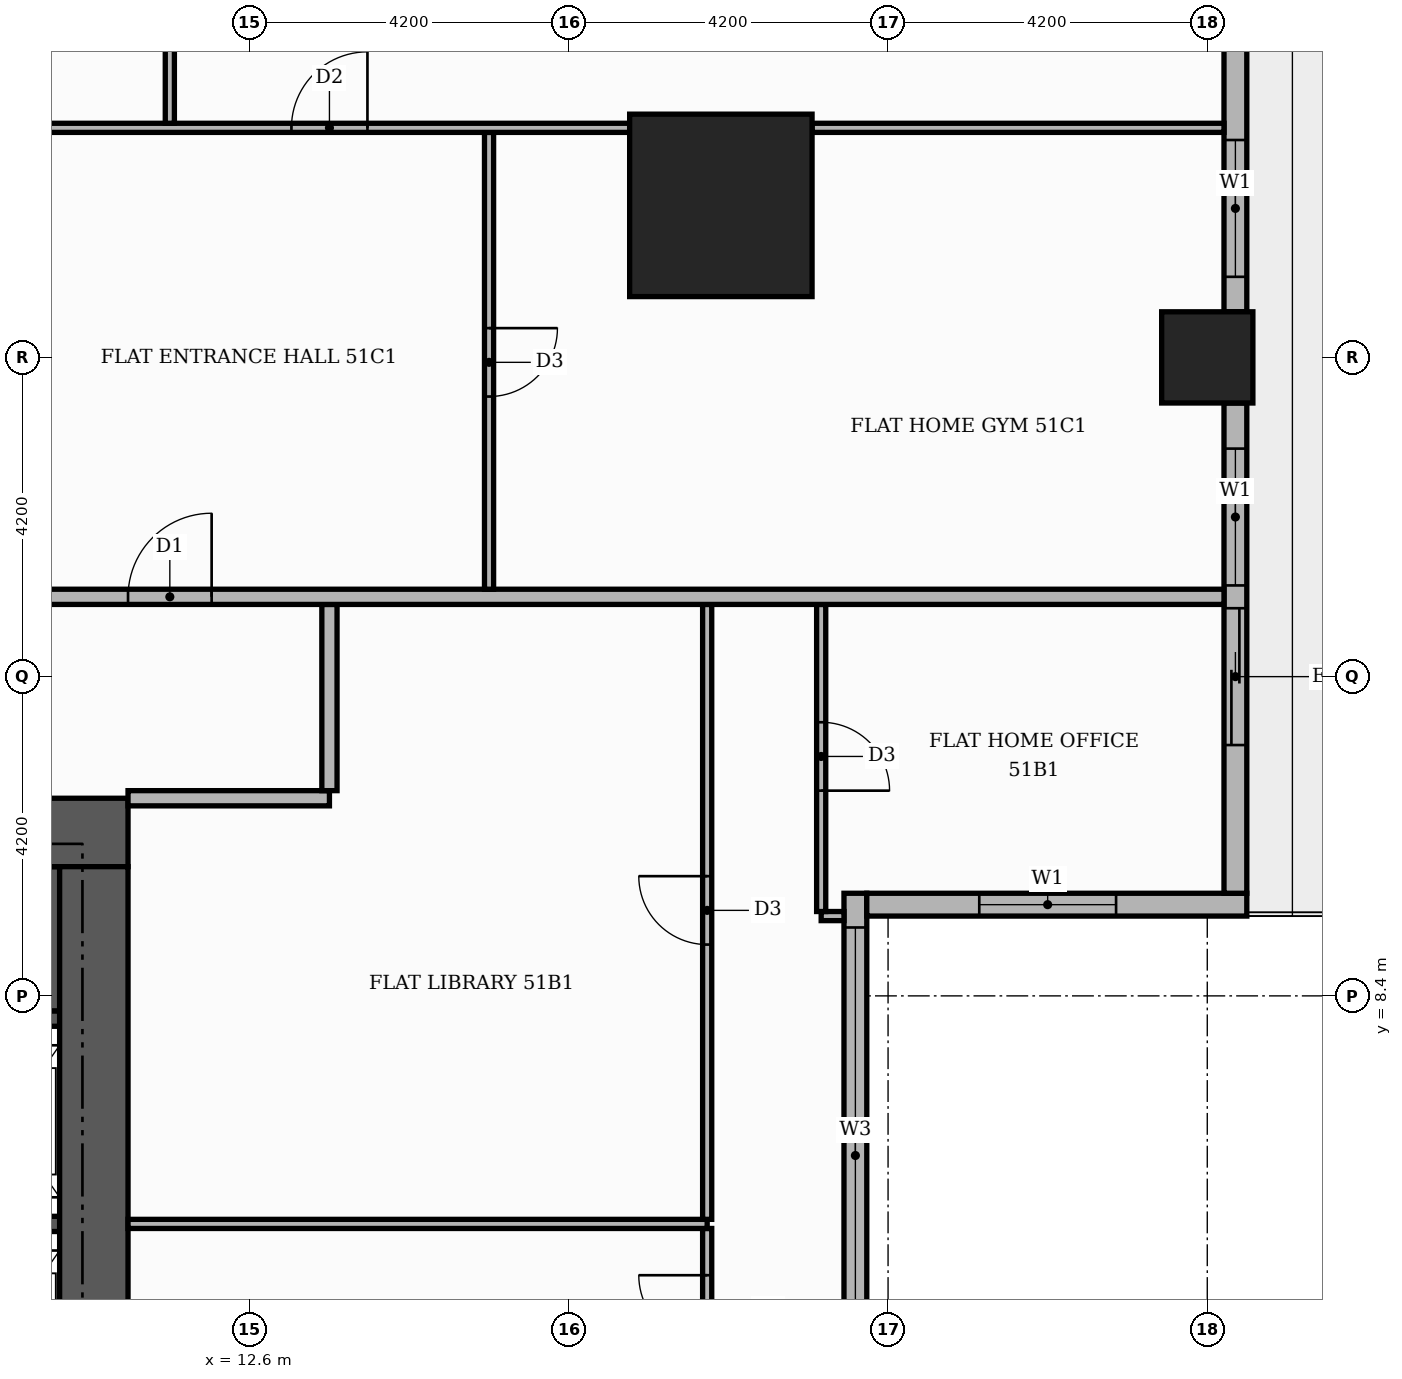
"""IFC4 building model, lengths in metres.
Left out: names, types, materials, properties, quantities, classifications, styles, units other than length and angle.
Written with IfcOpenShell. Run it as: python <this file> out.ifc"""

import sys

from ifc_helpers import new_model, si_unit, direction, frame, frame_2d, origin, origin_2d, place, context, subcontext, project, spatial, rectangle, extrude, element, fill, save


model = new_model("IFC4")
c1 = context("Model", 3, precision=1e-05, world=origin(), true_north=direction((0.0, 1.0)))
c2 = subcontext(c1, "Body", "Model", "MODEL_VIEW")
j1 = project(units=[si_unit("LENGTHUNIT", "METRE"), si_unit("PLANEANGLEUNIT", "RADIAN")], contexts=[c1])
p1 = place(None, origin())
s1 = spatial("IfcSite", under=j1, at=p1, CompositionType="ELEMENT")
p2 = place(p1, origin())
s2 = spatial("IfcBuilding", under=s1, at=p2, CompositionType="ELEMENT")
p3 = place(p2, frame((0.0, 0.0, 215.7)))
s3 = spatial("IfcBuildingStorey", under=s2, at=p3, CompositionType="ELEMENT", Elevation=215.7)
p4 = place(p3, frame((5.5, 9.15, 0.0), z_axis=(0.0, 0.0, 1.0), x_axis=(1.0, 0.0, 0.0)))
e1 = element("IfcWall", 1, at=p4, inside=s3, PredefinedType="SHEAR", context=c2, shape_type="SweptSolid", body=[
    extrude(rectangle(XDim=4.6, YDim=1.9, at=frame_2d((2.3, 0.0))), origin(), (0.0, 0.0, 1.0), 3.48),
])
for number, where, z_axis, x_axis in (
    (2, (8.1, 5.4, 0.0), (0.0, 0.0, 1.0), (1.0, 0.0, 0.0)),
    (3, (8.1, 8.1, 0.0), (0.0, 0.0, 1.0), (1.0, 0.0, 0.0)),
):
    element("IfcWall", number, at=place(p3, frame(where, z_axis=z_axis, x_axis=x_axis)), inside=s3, PredefinedType="SHEAR", context=c2, shape_type="SweptSolid", body=[
        extrude(rectangle(XDim=2.0, YDim=0.2, at=frame_2d((1.0, 0.0))), origin(), (0.0, 0.0, 1.0), 3.48),
    ])
p5 = place(p3, frame((-11.0, 10.55, 0.0), z_axis=(0.0, 0.0, 1.0), x_axis=(1.0, 0.0, 0.0)))
e4 = element("IfcWall", 4, at=p5, inside=s3, PredefinedType="SHEAR", context=c2, shape_type="SweptSolid", body=[
    extrude(rectangle(XDim=22.0, YDim=0.9, at=frame_2d((11.0, 0.0))), origin(), (0.0, 0.0, 1.0), 3.48),
])
p6 = place(p5, frame((13.3, 0.0, 0.0)))
e5 = element("IfcOpeningElement", 5, at=p6, cuts=e4, PredefinedType="OPENING", context=c2, shape_type="SweptSolid", body=[
    extrude(rectangle(XDim=1.8, YDim=2.2, at=frame_2d((0.9, 1.1))), frame((0.0, 0.46, 0.0), z_axis=(0.0, -1.0, 0.0), x_axis=(1.0, 0.0, 0.0)), (0.0, 0.0, 1.0), 0.92),
])
p7 = place(p3, frame((10.55, -10.1, 0.0), z_axis=(0.0, 0.0, 1.0), x_axis=(0.0, 1.0, 0.0)))
e6 = element("IfcWall", 6, at=p7, inside=s3, PredefinedType="SHEAR", context=c2, shape_type="SweptSolid", body=[
    extrude(rectangle(XDim=20.2, YDim=0.9, at=frame_2d((10.1, 0.0))), origin(), (0.0, 0.0, 1.0), 3.48),
])
p8 = place(p3, frame((18.8, 18.8, 0.0), z_axis=(0.0, 0.0, 1.0), x_axis=(1.0, 0.0, 0.0)))
e7 = element("IfcColumn", 7, at=p8, inside=s3, PredefinedType="COLUMN", context=c2, shape_type="SweptSolid", body=[
    extrude(rectangle(XDim=2.4, YDim=2.4, at=origin_2d()), origin(), (0.0, 0.0, 1.0), 3.9),
])
p9 = place(p3, frame((25.2, 16.8, 0.0), z_axis=(0.0, 0.0, 1.0), x_axis=(1.0, 0.0, 0.0)))
e8 = element("IfcColumn", 8, at=p9, inside=s3, PredefinedType="COLUMN", context=c2, shape_type="SweptSolid", body=[
    extrude(rectangle(XDim=1.2, YDim=1.2, at=origin_2d()), origin(), (0.0, 0.0, 1.0), 3.9),
])
p10 = place(p3, frame((20.57, -9.45, 0.0), z_axis=(0.0, 0.0, 1.0), x_axis=(0.0, 1.0, 0.0)))
e9 = element("IfcWall", 9, at=p10, inside=s3, PredefinedType="STANDARD", context=c2, shape_type="SweptSolid", body=[
    extrude(rectangle(XDim=19.2, YDim=0.3, at=frame_2d((9.6, 0.0))), origin(), (0.0, 0.0, 1.0), 3.48),
])
p11 = place(p10, frame((0.15, 0.0, 0.9)))
e10 = element("IfcOpeningElement", 10, at=p11, cuts=e9, PredefinedType="OPENING", context=c2, shape_type="SweptSolid", body=[
    extrude(rectangle(XDim=6.0, YDim=2.1, at=frame_2d((3.0, 1.05))), frame((0.0, 0.16, 0.0), z_axis=(0.0, -1.0, 0.0), x_axis=(1.0, 0.0, 0.0)), (0.0, 0.0, 1.0), 0.32),
])
p12 = place(p10, frame((6.45, 0.0, 0.9)))
e11 = element("IfcOpeningElement", 11, at=p12, cuts=e9, PredefinedType="OPENING", context=c2, shape_type="SweptSolid", body=[
    extrude(rectangle(XDim=6.0, YDim=2.1, at=frame_2d((3.0, 1.05))), frame((0.0, 0.16, 0.0), z_axis=(0.0, -1.0, 0.0), x_axis=(1.0, 0.0, 0.0)), (0.0, 0.0, 1.0), 0.32),
])
p13 = place(p10, frame((12.75, 0.0, 0.9)))
e12 = element("IfcOpeningElement", 12, at=p13, cuts=e9, PredefinedType="OPENING", context=c2, shape_type="SweptSolid", body=[
    extrude(rectangle(XDim=6.0, YDim=2.1, at=frame_2d((3.0, 1.05))), frame((0.0, 0.16, 0.0), z_axis=(0.0, -1.0, 0.0), x_axis=(1.0, 0.0, 0.0)), (0.0, 0.0, 1.0), 0.32),
])
p14 = place(p3, frame((20.72, 9.6, 0.0), z_axis=(0.0, 0.0, 1.0), x_axis=(1.0, 0.0, 0.0)))
e13 = element("IfcWall", 13, at=p14, inside=s3, PredefinedType="STANDARD", context=c2, shape_type="SweptSolid", body=[
    extrude(rectangle(XDim=5.0, YDim=0.3, at=frame_2d((2.5, 0.0))), origin(), (0.0, 0.0, 1.0), 3.48),
])
p15 = place(p14, frame((1.48, 0.0, 0.9)))
e14 = element("IfcOpeningElement", 14, at=p15, cuts=e13, PredefinedType="OPENING", context=c2, shape_type="SweptSolid", body=[
    extrude(rectangle(XDim=1.8, YDim=2.1, at=frame_2d((0.9, 1.05))), frame((0.0, 0.16, 0.0), z_axis=(0.0, -1.0, 0.0), x_axis=(1.0, 0.0, 0.0)), (0.0, 0.0, 1.0), 0.32),
])
p16 = place(p3, frame((25.57, 9.75, 0.0), z_axis=(0.0, 0.0, 1.0), x_axis=(0.0, 1.0, 0.0)))
e15 = element("IfcWall", 15, at=p16, inside=s3, PredefinedType="STANDARD", context=c2, shape_type="SweptSolid", body=[
    extrude(rectangle(XDim=6.45, YDim=0.3, at=frame_2d((3.225, 0.0))), origin(), (0.0, 0.0, 1.0), 3.48),
])
p17 = place(p16, frame((1.95, 0.0, 0.0)))
e16 = element("IfcOpeningElement", 16, at=p17, cuts=e15, PredefinedType="OPENING", context=c2, shape_type="SweptSolid", body=[
    extrude(rectangle(XDim=1.8, YDim=2.4, at=frame_2d((0.9, 1.2))), frame((0.0, 0.16, 0.0), z_axis=(0.0, -1.0, 0.0), x_axis=(1.0, 0.0, 0.0)), (0.0, 0.0, 1.0), 0.32),
])
p18 = place(p16, frame((4.05, 0.0, 0.9)))
e17 = element("IfcOpeningElement", 17, at=p18, cuts=e15, PredefinedType="OPENING", context=c2, shape_type="SweptSolid", body=[
    extrude(rectangle(XDim=1.8, YDim=2.1, at=frame_2d((0.9, 1.05))), frame((0.0, 0.16, 0.0), z_axis=(0.0, -1.0, 0.0), x_axis=(1.0, 0.0, 0.0)), (0.0, 0.0, 1.0), 0.32),
])
p19 = place(p3, frame((25.57, 17.4, 0.0), z_axis=(0.0, 0.0, 1.0), x_axis=(0.0, 1.0, 0.0)))
e18 = element("IfcWall", 18, at=p19, inside=s3, PredefinedType="STANDARD", context=c2, shape_type="SweptSolid", body=[
    extrude(rectangle(XDim=3.82, YDim=0.3, at=frame_2d((1.91, 0.0))), origin(), (0.0, 0.0, 1.0), 3.48),
])
p20 = place(p19, frame((0.46, 0.0, 0.9)))
e19 = element("IfcOpeningElement", 19, at=p20, cuts=e18, PredefinedType="OPENING", context=c2, shape_type="SweptSolid", body=[
    extrude(rectangle(XDim=1.8, YDim=2.1, at=frame_2d((0.9, 1.05))), frame((0.0, 0.16, 0.0), z_axis=(0.0, -1.0, 0.0), x_axis=(1.0, 0.0, 0.0)), (0.0, 0.0, 1.0), 0.32),
])
p21 = place(p3, frame((18.62, 3.21, 0.0), z_axis=(0.0, 0.0, 1.0), x_axis=(0.0, 1.0, 0.0)))
e20 = element("IfcWall", 20, at=p21, inside=s3, PredefinedType="PARTITIONING", context=c2, shape_type="SweptSolid", body=[
    extrude(rectangle(XDim=2.13, YDim=0.12, at=frame_2d((1.065, 0.0))), origin(), (0.0, 0.0, 1.0), 3.48),
])
p22 = place(p21, frame((0.615, 0.0, 0.0)))
e21 = element("IfcOpeningElement", 21, at=p22, cuts=e20, PredefinedType="OPENING", context=c2, shape_type="SweptSolid", body=[
    extrude(rectangle(XDim=0.9, YDim=2.1, at=frame_2d((0.45, 1.05))), frame((0.0, 0.07, 0.0), z_axis=(0.0, -1.0, 0.0), x_axis=(1.0, 0.0, 0.0)), (0.0, 0.0, 1.0), 0.14),
])
p23 = place(p3, frame((11.0, 5.4, 0.0), z_axis=(0.0, 0.0, 1.0), x_axis=(1.0, 0.0, 0.0)))
e22 = element("IfcWall", 22, at=p23, inside=s3, PredefinedType="PARTITIONING", context=c2, shape_type="SweptSolid", body=[
    extrude(rectangle(XDim=7.62, YDim=0.12, at=frame_2d((3.81, 0.0))), origin(), (0.0, 0.0, 1.0), 3.48),
])
p24 = place(p3, frame((18.62, 5.46, 0.0), z_axis=(0.0, 0.0, 1.0), x_axis=(0.0, 1.0, 0.0)))
e23 = element("IfcWall", 23, at=p24, inside=s3, PredefinedType="PARTITIONING", context=c2, shape_type="SweptSolid", body=[
    extrude(rectangle(XDim=8.09, YDim=0.12, at=frame_2d((4.045, 0.0))), origin(), (0.0, 0.0, 1.0), 3.48),
])
p25 = place(p24, frame((3.615, 0.0, 0.0)))
e24 = element("IfcOpeningElement", 24, at=p25, cuts=e23, PredefinedType="OPENING", context=c2, shape_type="SweptSolid", body=[
    extrude(rectangle(XDim=0.9, YDim=2.1, at=frame_2d((0.45, 1.05))), frame((0.0, 0.07, 0.0), z_axis=(0.0, -1.0, 0.0), x_axis=(1.0, 0.0, 0.0)), (0.0, 0.0, 1.0), 0.14),
])
p26 = place(p3, frame((20.12, 9.45, 0.0), z_axis=(0.0, 0.0, 1.0), x_axis=(1.0, 0.0, 0.0)))
e25 = element("IfcWall", 25, at=p26, inside=s3, PredefinedType="PARTITIONING", context=c2, shape_type="SweptSolid", body=[
    extrude(rectangle(XDim=0.3, YDim=0.12, at=frame_2d((0.15, 0.0))), origin(), (0.0, 0.0, 1.0), 3.48),
])
p27 = place(p3, frame((20.12, 9.51, 0.0), z_axis=(0.0, 0.0, 1.0), x_axis=(0.0, 1.0, 0.0)))
e26 = element("IfcWall", 26, at=p27, inside=s3, PredefinedType="PARTITIONING", context=c2, shape_type="SweptSolid", body=[
    extrude(rectangle(XDim=4.04, YDim=0.12, at=frame_2d((2.02, 0.0))), origin(), (0.0, 0.0, 1.0), 3.48),
])
p28 = place(p27, frame((1.59, 0.0, 0.0)))
e27 = element("IfcOpeningElement", 27, at=p28, cuts=e26, PredefinedType="OPENING", context=c2, shape_type="SweptSolid", body=[
    extrude(rectangle(XDim=0.9, YDim=2.1, at=frame_2d((0.45, 1.05))), frame((0.0, 0.07, 0.0), z_axis=(0.0, -1.0, 0.0), x_axis=(1.0, 0.0, 0.0)), (0.0, 0.0, 1.0), 0.14),
])
p29 = place(p3, frame((11.0, 11.0, 0.0), z_axis=(0.0, 0.0, 1.0), x_axis=(1.0, 0.0, 0.0)))
e28 = element("IfcWall", 28, at=p29, inside=s3, PredefinedType="PARTITIONING", context=c2, shape_type="SweptSolid", body=[
    extrude(rectangle(XDim=2.65, YDim=0.2, at=frame_2d((1.325, 0.0))), origin(), (0.0, 0.0, 1.0), 3.48),
])
p30 = place(p3, frame((13.65, 11.1, 0.0), z_axis=(0.0, 0.0, 1.0), x_axis=(0.0, 1.0, 0.0)))
e29 = element("IfcWall", 29, at=p30, inside=s3, PredefinedType="PARTITIONING", context=c2, shape_type="SweptSolid", body=[
    extrude(rectangle(XDim=2.45, YDim=0.2, at=frame_2d((1.225, 0.0))), origin(), (0.0, 0.0, 1.0), 3.48),
])
p31 = place(p3, frame((-13.65, 13.65, 0.0), z_axis=(0.0, 0.0, 1.0), x_axis=(1.0, 0.0, 0.0)))
e30 = element("IfcWall", 30, at=p31, inside=s3, PredefinedType="PARTITIONING", context=c2, shape_type="SweptSolid", body=[
    extrude(rectangle(XDim=39.07, YDim=0.2, at=frame_2d((19.535, 0.0))), origin(), (0.0, 0.0, 1.0), 3.48),
])
p32 = place(p31, frame((24.65, 0.0, 0.0)))
e31 = element("IfcOpeningElement", 31, at=p32, cuts=e30, PredefinedType="OPENING", context=c2, shape_type="SweptSolid", body=[
    extrude(rectangle(XDim=1.1, YDim=2.4, at=frame_2d((0.55, 1.2))), frame((0.0, 0.11, 0.0), z_axis=(0.0, -1.0, 0.0), x_axis=(1.0, 0.0, 0.0)), (0.0, 0.0, 1.0), 0.22),
])
p33 = place(p3, frame((15.75, 13.75, 0.0), z_axis=(0.0, 0.0, 1.0), x_axis=(0.0, 1.0, 0.0)))
e32 = element("IfcWall", 32, at=p33, inside=s3, PredefinedType="PARTITIONING", context=c2, shape_type="SweptSolid", body=[
    extrude(rectangle(XDim=6.01, YDim=0.12, at=frame_2d((3.005, 0.0))), origin(), (0.0, 0.0, 1.0), 3.48),
])
p34 = place(p33, frame((2.535, 0.0, 0.0)))
e33 = element("IfcOpeningElement", 33, at=p34, cuts=e32, PredefinedType="OPENING", context=c2, shape_type="SweptSolid", body=[
    extrude(rectangle(XDim=0.9, YDim=2.1, at=frame_2d((0.45, 1.05))), frame((0.0, 0.07, 0.0), z_axis=(0.0, -1.0, 0.0), x_axis=(1.0, 0.0, 0.0)), (0.0, 0.0, 1.0), 0.14),
])
p35 = place(p3, frame((-13.55, 19.82, 0.0), z_axis=(0.0, 0.0, 1.0), x_axis=(1.0, 0.0, 0.0)))
e34 = element("IfcWall", 34, at=p35, inside=s3, PredefinedType="PARTITIONING", context=c2, shape_type="SweptSolid", body=[
    extrude(rectangle(XDim=31.15, YDim=0.12, at=frame_2d((15.575, 0.0))), origin(), (0.0, 0.0, 1.0), 3.48),
])
p36 = place(p35, frame((26.7, 0.0, 0.0)))
e35 = element("IfcOpeningElement", 35, at=p36, cuts=e34, PredefinedType="OPENING", context=c2, shape_type="SweptSolid", body=[
    extrude(rectangle(XDim=1.0, YDim=2.1, at=frame_2d((0.5, 1.05))), frame((0.0, 0.07, 0.0), z_axis=(0.0, -1.0, 0.0), x_axis=(1.0, 0.0, 0.0)), (0.0, 0.0, 1.0), 0.14),
])
p37 = place(p35, frame((20.4, 0.0, 0.0)))
e36 = element("IfcOpeningElement", 36, at=p37, cuts=e34, PredefinedType="OPENING", context=c2, shape_type="SweptSolid", body=[
    extrude(rectangle(XDim=1.0, YDim=2.1, at=frame_2d((0.5, 1.05))), frame((0.0, 0.07, 0.0), z_axis=(0.0, -1.0, 0.0), x_axis=(1.0, 0.0, 0.0)), (0.0, 0.0, 1.0), 0.14),
])
p38 = place(p35, frame((13.1, 0.0, 0.0)))
e37 = element("IfcOpeningElement", 37, at=p38, cuts=e34, PredefinedType="OPENING", context=c2, shape_type="SweptSolid", body=[
    extrude(rectangle(XDim=0.9, YDim=2.1, at=frame_2d((0.45, 1.05))), frame((0.0, 0.07, 0.0), z_axis=(0.0, -1.0, 0.0), x_axis=(1.0, 0.0, 0.0)), (0.0, 0.0, 1.0), 0.14),
])
p39 = place(p35, frame((3.65, 0.0, 0.0)))
e38 = element("IfcOpeningElement", 38, at=p39, cuts=e34, PredefinedType="OPENING", context=c2, shape_type="SweptSolid", body=[
    extrude(rectangle(XDim=0.9, YDim=2.1, at=frame_2d((0.45, 1.05))), frame((0.0, 0.07, 0.0), z_axis=(0.0, -1.0, 0.0), x_axis=(1.0, 0.0, 0.0)), (0.0, 0.0, 1.0), 0.14),
])
p40 = place(p3, frame((20.0, 19.82, 0.0), z_axis=(0.0, 0.0, 1.0), x_axis=(1.0, 0.0, 0.0)))
e39 = element("IfcWall", 39, at=p40, inside=s3, PredefinedType="PARTITIONING", context=c2, shape_type="SweptSolid", body=[
    extrude(rectangle(XDim=5.42, YDim=0.12, at=frame_2d((2.71, 0.0))), origin(), (0.0, 0.0, 1.0), 3.48),
])
p41 = place(p3, frame((11.55, 19.88, 0.0), z_axis=(0.0, 0.0, 1.0), x_axis=(0.0, 1.0, 0.0)))
e40 = element("IfcWall", 40, at=p41, inside=s3, PredefinedType="PARTITIONING", context=c2, shape_type="SweptSolid", body=[
    extrude(rectangle(XDim=5.54, YDim=0.12, at=frame_2d((2.77, 0.0))), origin(), (0.0, 0.0, 1.0), 3.48),
])
p42 = place(p13, origin())
e41 = element("IfcWindow", 41, at=p42, inside=s3, PartitioningType="SINGLE_PANEL", PredefinedType="WINDOW", context=c2, shape_type="SweptSolid", body=[
    extrude(rectangle(XDim=6.0, YDim=2.1, at=frame_2d((3.0, 1.05))), frame((0.0, 0.03, 0.0), z_axis=(0.0, -1.0, 0.0), x_axis=(1.0, 0.0, 0.0)), (0.0, 0.0, 1.0), 0.06),
])
fill(e12, e41)
p43 = place(p15, origin())
e42 = element("IfcWindow", 42, at=p43, inside=s3, PartitioningType="SINGLE_PANEL", PredefinedType="WINDOW", context=c2, shape_type="SweptSolid", body=[
    extrude(rectangle(XDim=1.8, YDim=2.1, at=frame_2d((0.9, 1.05))), frame((0.0, 0.03, 0.0), z_axis=(0.0, -1.0, 0.0), x_axis=(1.0, 0.0, 0.0)), (0.0, 0.0, 1.0), 0.06),
])
fill(e14, e42)
p44 = place(p17, origin())
e43 = element("IfcDoor", 43, at=p44, inside=s3, OperationType="SLIDING_TO_RIGHT", PredefinedType="DOOR", context=c2, shape_type="SweptSolid", body=[
    extrude(rectangle(XDim=1.8, YDim=2.4, at=frame_2d((0.9, 1.2))), frame((0.0, 0.025, 0.0), z_axis=(0.0, -1.0, 0.0), x_axis=(1.0, 0.0, 0.0)), (0.0, 0.0, 1.0), 0.05),
])
fill(e16, e43)
p45 = place(p18, origin())
e44 = element("IfcWindow", 44, at=p45, inside=s3, PartitioningType="SINGLE_PANEL", PredefinedType="WINDOW", context=c2, shape_type="SweptSolid", body=[
    extrude(rectangle(XDim=1.8, YDim=2.1, at=frame_2d((0.9, 1.05))), frame((0.0, 0.03, 0.0), z_axis=(0.0, -1.0, 0.0), x_axis=(1.0, 0.0, 0.0)), (0.0, 0.0, 1.0), 0.06),
])
fill(e17, e44)
p46 = place(p20, origin())
e45 = element("IfcWindow", 45, at=p46, inside=s3, PartitioningType="SINGLE_PANEL", PredefinedType="WINDOW", context=c2, shape_type="SweptSolid", body=[
    extrude(rectangle(XDim=1.8, YDim=2.1, at=frame_2d((0.9, 1.05))), frame((0.0, 0.03, 0.0), z_axis=(0.0, -1.0, 0.0), x_axis=(1.0, 0.0, 0.0)), (0.0, 0.0, 1.0), 0.06),
])
fill(e19, e45)
p47 = place(p22, origin())
e46 = element("IfcDoor", 46, at=p47, inside=s3, OperationType="SINGLE_SWING_RIGHT", PredefinedType="DOOR", context=c2, shape_type="SweptSolid", body=[
    extrude(rectangle(XDim=0.9, YDim=2.1, at=frame_2d((0.45, 1.05))), frame((0.0, 0.025, 0.0), z_axis=(0.0, -1.0, 0.0), x_axis=(1.0, 0.0, 0.0)), (0.0, 0.0, 1.0), 0.05),
])
fill(e21, e46)
p48 = place(p25, origin())
e47 = element("IfcDoor", 47, at=p48, inside=s3, OperationType="SINGLE_SWING_RIGHT", PredefinedType="DOOR", context=c2, shape_type="SweptSolid", body=[
    extrude(rectangle(XDim=0.9, YDim=2.1, at=frame_2d((0.45, 1.05))), frame((0.0, 0.025, 0.0), z_axis=(0.0, -1.0, 0.0), x_axis=(1.0, 0.0, 0.0)), (0.0, 0.0, 1.0), 0.05),
])
fill(e24, e47)
p49 = place(p28, frame((0.9, 0.0, 0.0), z_axis=(0.0, 0.0, 1.0), x_axis=(-1.0, 0.0, 0.0)))
e48 = element("IfcDoor", 48, at=p49, inside=s3, OperationType="SINGLE_SWING_LEFT", PredefinedType="DOOR", context=c2, shape_type="SweptSolid", body=[
    extrude(rectangle(XDim=0.9, YDim=2.1, at=frame_2d((0.45, 1.05))), frame((0.0, 0.025, 0.0), z_axis=(0.0, -1.0, 0.0), x_axis=(1.0, 0.0, 0.0)), (0.0, 0.0, 1.0), 0.05),
])
fill(e27, e48)
p50 = place(p32, origin())
e49 = element("IfcDoor", 49, at=p50, inside=s3, OperationType="SINGLE_SWING_RIGHT", PredefinedType="DOOR", context=c2, shape_type="SweptSolid", body=[
    extrude(rectangle(XDim=1.1, YDim=2.4, at=frame_2d((0.55, 1.2))), frame((0.0, 0.025, 0.0), z_axis=(0.0, -1.0, 0.0), x_axis=(1.0, 0.0, 0.0)), (0.0, 0.0, 1.0), 0.05),
])
fill(e31, e49)
p51 = place(p34, frame((0.9, 0.0, 0.0), z_axis=(0.0, 0.0, 1.0), x_axis=(-1.0, 0.0, 0.0)))
e50 = element("IfcDoor", 50, at=p51, inside=s3, OperationType="SINGLE_SWING_RIGHT", PredefinedType="DOOR", context=c2, shape_type="SweptSolid", body=[
    extrude(rectangle(XDim=0.9, YDim=2.1, at=frame_2d((0.45, 1.05))), frame((0.0, 0.025, 0.0), z_axis=(0.0, -1.0, 0.0), x_axis=(1.0, 0.0, 0.0)), (0.0, 0.0, 1.0), 0.05),
])
fill(e33, e50)
p52 = place(p36, origin())
e51 = element("IfcDoor", 51, at=p52, inside=s3, OperationType="SINGLE_SWING_RIGHT", PredefinedType="DOOR", context=c2, shape_type="SweptSolid", body=[
    extrude(rectangle(XDim=1.0, YDim=2.1, at=frame_2d((0.5, 1.05))), frame((0.0, 0.025, 0.0), z_axis=(0.0, -1.0, 0.0), x_axis=(1.0, 0.0, 0.0)), (0.0, 0.0, 1.0), 0.05),
])
fill(e35, e51)
save(model, sys.argv[1])
